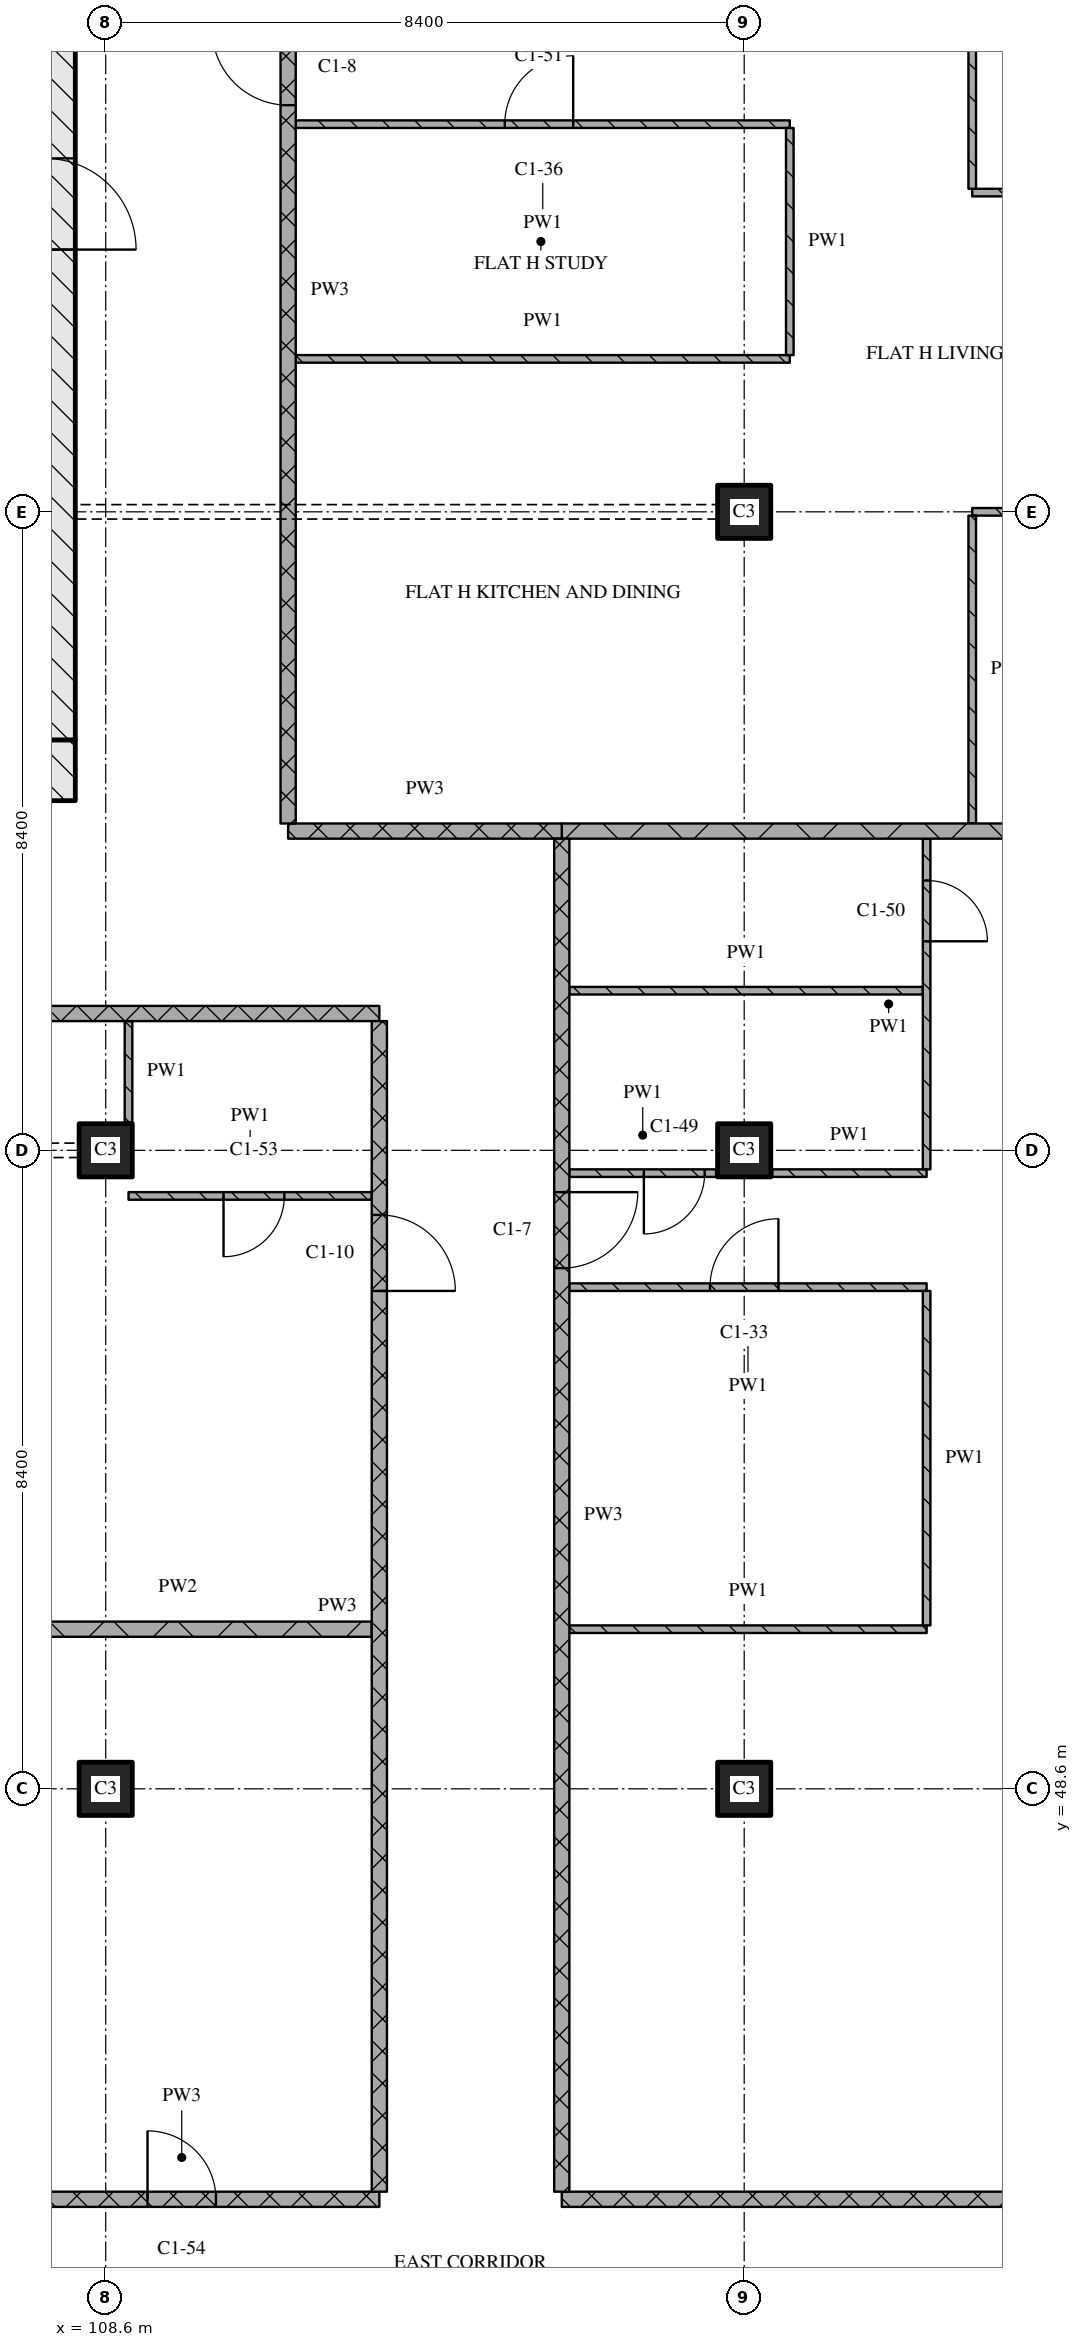
"""IFC4 building model, lengths in metres.
Left out: names, types, materials, properties, quantities, classifications, styles, units other than length and angle.
Written with IfcOpenShell. Run it as: python <this file> out.ifc"""

import sys

from ifc_helpers import new_model, si_unit, direction, frame, frame_2d, origin, origin_2d, place, context, subcontext, project, spatial, rectangle, extrude, element, fill, save


model = new_model("IFC4")
c1 = context("Model", 3, precision=1e-05, world=origin(), true_north=direction((0.0, 1.0)))
c2 = subcontext(c1, "Body", "Model", "MODEL_VIEW")
j1 = project(units=[si_unit("LENGTHUNIT", "METRE"), si_unit("PLANEANGLEUNIT", "RADIAN")], contexts=[c1])
p1 = place(None, origin())
s1 = spatial("IfcSite", under=j1, at=p1, CompositionType="ELEMENT")
p2 = place(p1, origin())
s2 = spatial("IfcBuilding", under=s1, at=p2, CompositionType="ELEMENT")
p3 = place(p2, frame((0.0, 0.0, 147.45)))
s3 = spatial("IfcBuildingStorey", under=s2, at=p3, CompositionType="ELEMENT", Elevation=147.45)
for number, where, z_axis, x_axis in (
    (1, (108.6, 48.6, 0.0), (0.0, 0.0, 1.0), (1.0, 0.0, 0.0)),
    (2, (108.6, 57.0, 0.0), (0.0, 0.0, 1.0), (1.0, 0.0, 0.0)),
    (3, (117.0, 48.6, 0.0), (0.0, 0.0, 1.0), (1.0, 0.0, 0.0)),
    (4, (117.0, 57.0, 0.0), (0.0, 0.0, 1.0), (1.0, 0.0, 0.0)),
    (5, (117.0, 65.4, 0.0), (0.0, 0.0, 1.0), (1.0, 0.0, 0.0)),
):
    element("IfcColumn", number, at=place(p3, frame(where, z_axis=z_axis, x_axis=x_axis)), inside=s3, PredefinedType="COLUMN", context=c2, shape_type="SweptSolid", body=[
        extrude(rectangle(XDim=0.7, YDim=0.7, at=origin_2d()), origin(), (0.0, 0.0, 1.0), 3.6),
    ])
p4 = place(p3, frame((67.0, 62.0, 0.0), z_axis=(0.0, 0.0, 1.0), x_axis=(1.0, 0.0, 0.0)))
e6 = element("IfcWall", 6, at=p4, inside=s3, PredefinedType="SOLIDWALL", context=c2, shape_type="SweptSolid", body=[
    extrude(rectangle(XDim=41.2, YDim=0.8, at=frame_2d((20.6, 0.0))), origin(), (0.0, 0.0, 1.0), 3.32),
])
p5 = place(p4, frame((20.95, 0.0, 0.0)))
e7 = element("IfcOpeningElement", 7, at=p5, cuts=e6, PredefinedType="OPENING", context=c2, shape_type="SweptSolid", body=[
    extrude(rectangle(XDim=1.8, YDim=2.1, at=frame_2d((0.9, 1.05))), frame((0.0, 0.41, 0.0), z_axis=(0.0, -1.0, 0.0), x_axis=(1.0, 0.0, 0.0)), (0.0, 0.0, 1.0), 0.82),
])
p6 = place(p3, frame((107.8, 62.4, 0.0), z_axis=(0.0, 0.0, 1.0), x_axis=(0.0, 1.0, 0.0)))
e8 = element("IfcWall", 8, at=p6, inside=s3, PredefinedType="SOLIDWALL", context=c2, shape_type="SweptSolid", body=[
    extrude(rectangle(XDim=12.0, YDim=0.8, at=frame_2d((6.0, 0.0))), origin(), (0.0, 0.0, 1.0), 3.32),
])
p7 = place(p6, frame((6.45, 0.0, 0.0)))
e9 = element("IfcOpeningElement", 9, at=p7, cuts=e8, PredefinedType="OPENING", context=c2, shape_type="SweptSolid", body=[
    extrude(rectangle(XDim=1.2, YDim=2.1, at=frame_2d((0.6, 1.05))), frame((0.0, 0.41, 0.0), z_axis=(0.0, -1.0, 0.0), x_axis=(1.0, 0.0, 0.0)), (0.0, 0.0, 1.0), 0.82),
])
p8 = place(p3, frame((107.0, 43.2, 0.0), z_axis=(0.0, 0.0, 1.0), x_axis=(1.0, 0.0, 0.0)))
e10 = element("IfcWall", 10, at=p8, inside=s3, PredefinedType="PARTITIONING", context=c2, shape_type="SweptSolid", body=[
    extrude(rectangle(XDim=5.2, YDim=0.2, at=frame_2d((2.6, 0.0))), origin(), (0.0, 0.0, 1.0), 3.32),
])
p9 = place(p8, frame((2.15, 0.0, 0.0)))
e11 = element("IfcOpeningElement", 11, at=p9, cuts=e10, PredefinedType="OPENING", context=c2, shape_type="SweptSolid", body=[
    extrude(rectangle(XDim=0.9, YDim=2.1, at=frame_2d((0.45, 1.05))), frame((0.0, 0.11, 0.0), z_axis=(0.0, -1.0, 0.0), x_axis=(1.0, 0.0, 0.0)), (0.0, 0.0, 1.0), 0.22),
])
p10 = place(p3, frame((114.6, 43.2, 0.0), z_axis=(0.0, 0.0, 1.0), x_axis=(1.0, 0.0, 0.0)))
e12 = element("IfcWall", 12, at=p10, inside=s3, PredefinedType="PARTITIONING", context=c2, shape_type="SweptSolid", body=[
    extrude(rectangle(XDim=12.32, YDim=0.2, at=frame_2d((6.16, 0.0))), origin(), (0.0, 0.0, 1.0), 3.32),
])
p11 = place(p3, frame((107.0, 50.7, 0.0), z_axis=(0.0, 0.0, 1.0), x_axis=(1.0, 0.0, 0.0)))
e13 = element("IfcWall", 13, at=p11, inside=s3, PredefinedType="PARTITIONING", context=c2, shape_type="SweptSolid", body=[
    extrude(rectangle(XDim=5.1, YDim=0.2, at=frame_2d((2.55, 0.0))), origin(), (0.0, 0.0, 1.0), 3.32),
])
p12 = place(p3, frame((114.7, 50.7, 0.0), z_axis=(0.0, 0.0, 1.0), x_axis=(1.0, 0.0, 0.0)))
e14 = element("IfcWall", 14, at=p12, inside=s3, PredefinedType="PARTITIONING", context=c2, shape_type="SweptSolid", body=[
    extrude(rectangle(XDim=4.7, YDim=0.1, at=frame_2d((2.35, 0.0))), origin(), (0.0, 0.0, 1.0), 3.32),
])
p13 = place(p3, frame((119.4, 55.2, 0.0), z_axis=(0.0, 0.0, 1.0), x_axis=(-1.0, 0.0, 0.0)))
e15 = element("IfcWall", 15, at=p13, inside=s3, PredefinedType="PARTITIONING", context=c2, shape_type="SweptSolid", body=[
    extrude(rectangle(XDim=4.7, YDim=0.1, at=frame_2d((2.35, 0.0))), origin(), (0.0, 0.0, 1.0), 3.32),
])
p14 = place(p13, frame((1.95, 0.0, 0.0)))
e16 = element("IfcOpeningElement", 16, at=p14, cuts=e15, PredefinedType="OPENING", context=c2, shape_type="SweptSolid", body=[
    extrude(rectangle(XDim=0.9, YDim=2.1, at=frame_2d((0.45, 1.05))), frame((0.0, 0.06, 0.0), z_axis=(0.0, -1.0, 0.0), x_axis=(1.0, 0.0, 0.0)), (0.0, 0.0, 1.0), 0.12),
])
p15 = place(p3, frame((108.9, 56.4, 0.0), z_axis=(0.0, 0.0, 1.0), x_axis=(1.0, 0.0, 0.0)))
e17 = element("IfcWall", 17, at=p15, inside=s3, PredefinedType="PARTITIONING", context=c2, shape_type="SweptSolid", body=[
    extrude(rectangle(XDim=3.2, YDim=0.1, at=frame_2d((1.6, 0.0))), origin(), (0.0, 0.0, 1.0), 3.32),
])
p16 = place(p15, frame((1.25, 0.0, 0.0)))
e18 = element("IfcOpeningElement", 18, at=p16, cuts=e17, PredefinedType="OPENING", context=c2, shape_type="SweptSolid", body=[
    extrude(rectangle(XDim=0.8, YDim=2.1, at=frame_2d((0.4, 1.05))), frame((0.0, 0.06, 0.0), z_axis=(0.0, -1.0, 0.0), x_axis=(1.0, 0.0, 0.0)), (0.0, 0.0, 1.0), 0.12),
])
p17 = place(p3, frame((114.7, 56.7, 0.0), z_axis=(0.0, 0.0, 1.0), x_axis=(1.0, 0.0, 0.0)))
e19 = element("IfcWall", 19, at=p17, inside=s3, PredefinedType="PARTITIONING", context=c2, shape_type="SweptSolid", body=[
    extrude(rectangle(XDim=1.93, YDim=0.1, at=frame_2d((0.965, 0.0))), origin(), (0.0, 0.0, 1.0), 3.32),
])
p18 = place(p17, frame((0.98, 0.0, 0.0)))
e20 = element("IfcOpeningElement", 20, at=p18, cuts=e19, PredefinedType="OPENING", context=c2, shape_type="SweptSolid", body=[
    extrude(rectangle(XDim=0.8, YDim=2.1, at=frame_2d((0.4, 1.05))), frame((0.0, 0.06, 0.0), z_axis=(0.0, -1.0, 0.0), x_axis=(1.0, 0.0, 0.0)), (0.0, 0.0, 1.0), 0.12),
])
p19 = place(p3, frame((117.37, 56.7, 0.0), z_axis=(0.0, 0.0, 1.0), x_axis=(1.0, 0.0, 0.0)))
e21 = element("IfcWall", 21, at=p19, inside=s3, PredefinedType="PARTITIONING", context=c2, shape_type="SweptSolid", body=[
    extrude(rectangle(XDim=2.03, YDim=0.1, at=frame_2d((1.015, 0.0))), origin(), (0.0, 0.0, 1.0), 3.32),
])
p20 = place(p3, frame((101.4, 58.8, 0.0), z_axis=(0.0, 0.0, 1.0), x_axis=(1.0, 0.0, 0.0)))
e22 = element("IfcWall", 22, at=p20, inside=s3, PredefinedType="PARTITIONING", context=c2, shape_type="SweptSolid", body=[
    extrude(rectangle(XDim=10.8, YDim=0.2, at=frame_2d((5.4, 0.0))), origin(), (0.0, 0.0, 1.0), 3.32),
])
p21 = place(p3, frame((114.7, 59.1, 0.0), z_axis=(0.0, 0.0, 1.0), x_axis=(1.0, 0.0, 0.0)))
e23 = element("IfcWall", 23, at=p21, inside=s3, PredefinedType="PARTITIONING", context=c2, shape_type="SweptSolid", body=[
    extrude(rectangle(XDim=4.65, YDim=0.1, at=frame_2d((2.325, 0.0))), origin(), (0.0, 0.0, 1.0), 3.32),
])
p22 = place(p3, frame((111.0, 61.2, 0.0), z_axis=(0.0, 0.0, 1.0), x_axis=(1.0, 0.0, 0.0)))
e24 = element("IfcWall", 24, at=p22, inside=s3, PredefinedType="PARTITIONING", context=c2, shape_type="SweptSolid", body=[
    extrude(rectangle(XDim=3.6, YDim=0.2, at=frame_2d((1.8, 0.0))), origin(), (0.0, 0.0, 1.0), 3.32),
])
p23 = place(p3, frame((114.6, 61.2, 0.0), z_axis=(0.0, 0.0, 1.0), x_axis=(1.0, 0.0, 0.0)))
e25 = element("IfcWall", 25, at=p23, inside=s3, PredefinedType="PARTITIONING", context=c2, shape_type="SweptSolid", body=[
    extrude(rectangle(XDim=12.32, YDim=0.2, at=frame_2d((6.16, 0.0))), origin(), (0.0, 0.0, 1.0), 3.32),
])
p24 = place(p3, frame((124.48, 65.4, 0.0), z_axis=(0.0, 0.0, 1.0), x_axis=(-1.0, 0.0, 0.0)))
e26 = element("IfcWall", 26, at=p24, inside=s3, PredefinedType="PARTITIONING", context=c2, shape_type="SweptSolid", body=[
    extrude(rectangle(XDim=4.48, YDim=0.1, at=frame_2d((2.24, 0.0))), origin(), (0.0, 0.0, 1.0), 3.32),
])
p25 = place(p24, frame((0.43, 0.0, 0.0)))
e27 = element("IfcOpeningElement", 27, at=p25, cuts=e26, PredefinedType="OPENING", context=c2, shape_type="SweptSolid", body=[
    extrude(rectangle(XDim=0.9, YDim=2.1, at=frame_2d((0.45, 1.05))), frame((0.0, 0.06, 0.0), z_axis=(0.0, -1.0, 0.0), x_axis=(1.0, 0.0, 0.0)), (0.0, 0.0, 1.0), 0.12),
])
p26 = place(p3, frame((111.1, 67.412, 0.0), z_axis=(0.0, 0.0, 1.0), x_axis=(1.0, 0.0, 0.0)))
e28 = element("IfcWall", 28, at=p26, inside=s3, PredefinedType="PARTITIONING", context=c2, shape_type="SweptSolid", body=[
    extrude(rectangle(XDim=6.5, YDim=0.1, at=frame_2d((3.25, 0.0))), origin(), (0.0, 0.0, 1.0), 3.32),
])
p27 = place(p3, frame((120.0, 69.6, 0.0), z_axis=(0.0, 0.0, 1.0), x_axis=(1.0, 0.0, 0.0)))
e29 = element("IfcWall", 29, at=p27, inside=s3, PredefinedType="PARTITIONING", context=c2, shape_type="SweptSolid", body=[
    extrude(rectangle(XDim=6.92, YDim=0.1, at=frame_2d((3.46, 0.0))), origin(), (0.0, 0.0, 1.0), 3.32),
])
p28 = place(p3, frame((117.6, 70.5, 0.0), z_axis=(0.0, 0.0, 1.0), x_axis=(-1.0, 0.0, 0.0)))
e30 = element("IfcWall", 30, at=p28, inside=s3, PredefinedType="PARTITIONING", context=c2, shape_type="SweptSolid", body=[
    extrude(rectangle(XDim=6.5, YDim=0.1, at=frame_2d((3.25, 0.0))), origin(), (0.0, 0.0, 1.0), 3.32),
])
p29 = place(p28, frame((2.85, 0.0, 0.0)))
e31 = element("IfcOpeningElement", 31, at=p29, cuts=e30, PredefinedType="OPENING", context=c2, shape_type="SweptSolid", body=[
    extrude(rectangle(XDim=0.9, YDim=2.1, at=frame_2d((0.45, 1.05))), frame((0.0, 0.06, 0.0), z_axis=(0.0, -1.0, 0.0), x_axis=(1.0, 0.0, 0.0)), (0.0, 0.0, 1.0), 0.12),
])
p30 = place(p3, frame((108.9, 58.7, 0.0), z_axis=(0.0, 0.0, 1.0), x_axis=(0.0, -1.0, 0.0)))
e32 = element("IfcWall", 32, at=p30, inside=s3, PredefinedType="PARTITIONING", context=c2, shape_type="SweptSolid", body=[
    extrude(rectangle(XDim=1.33, YDim=0.1, at=frame_2d((0.665, 0.0))), origin(), (0.0, 0.0, 1.0), 3.32),
])
p31 = place(p3, frame((111.0, 75.32, 0.0), z_axis=(0.0, 0.0, 1.0), x_axis=(0.0, -1.0, 0.0)))
e33 = element("IfcWall", 33, at=p31, inside=s3, PredefinedType="PARTITIONING", context=c2, shape_type="SweptSolid", body=[
    extrude(rectangle(XDim=14.02, YDim=0.2, at=frame_2d((7.01, 0.0))), origin(), (0.0, 0.0, 1.0), 3.32),
])
p32 = place(p31, frame((3.57, 0.0, 0.0)))
e34 = element("IfcOpeningElement", 34, at=p32, cuts=e33, PredefinedType="OPENING", context=c2, shape_type="SweptSolid", body=[
    extrude(rectangle(XDim=1.0, YDim=2.1, at=frame_2d((0.5, 1.05))), frame((0.0, 0.11, 0.0), z_axis=(0.0, -1.0, 0.0), x_axis=(1.0, 0.0, 0.0)), (0.0, 0.0, 1.0), 0.22),
])
p33 = place(p3, frame((112.2, 43.3, 0.0), z_axis=(0.0, 0.0, 1.0), x_axis=(0.0, 1.0, 0.0)))
e35 = element("IfcWall", 35, at=p33, inside=s3, PredefinedType="PARTITIONING", context=c2, shape_type="SweptSolid", body=[
    extrude(rectangle(XDim=15.4, YDim=0.2, at=frame_2d((7.7, 0.0))), origin(), (0.0, 0.0, 1.0), 3.32),
])
p34 = place(p33, frame((11.85, 0.0, 0.0)))
e36 = element("IfcOpeningElement", 36, at=p34, cuts=e35, PredefinedType="OPENING", context=c2, shape_type="SweptSolid", body=[
    extrude(rectangle(XDim=1.0, YDim=2.1, at=frame_2d((0.5, 1.05))), frame((0.0, 0.11, 0.0), z_axis=(0.0, -1.0, 0.0), x_axis=(1.0, 0.0, 0.0)), (0.0, 0.0, 1.0), 0.22),
])
p35 = place(p3, frame((114.6, 61.1, 0.0), z_axis=(0.0, 0.0, 1.0), x_axis=(0.0, -1.0, 0.0)))
e37 = element("IfcWall", 37, at=p35, inside=s3, PredefinedType="PARTITIONING", context=c2, shape_type="SweptSolid", body=[
    extrude(rectangle(XDim=17.8, YDim=0.2, at=frame_2d((8.9, 0.0))), origin(), (0.0, 0.0, 1.0), 3.32),
])
p36 = place(p35, frame((4.65, 0.0, 0.0)))
e38 = element("IfcOpeningElement", 38, at=p36, cuts=e37, PredefinedType="OPENING", context=c2, shape_type="SweptSolid", body=[
    extrude(rectangle(XDim=1.0, YDim=2.1, at=frame_2d((0.5, 1.05))), frame((0.0, 0.11, 0.0), z_axis=(0.0, -1.0, 0.0), x_axis=(1.0, 0.0, 0.0)), (0.0, 0.0, 1.0), 0.22),
])
p37 = place(p3, frame((117.6, 70.45, 0.0), z_axis=(0.0, 0.0, 1.0), x_axis=(0.0, -1.0, 0.0)))
e39 = element("IfcWall", 39, at=p37, inside=s3, PredefinedType="PARTITIONING", context=c2, shape_type="SweptSolid", body=[
    extrude(rectangle(XDim=2.988, YDim=0.1, at=frame_2d((1.494, 0.0))), origin(), (0.0, 0.0, 1.0), 3.32),
])
p38 = place(p3, frame((119.4, 55.15, 0.0), z_axis=(0.0, 0.0, 1.0), x_axis=(0.0, -1.0, 0.0)))
e40 = element("IfcWall", 40, at=p38, inside=s3, PredefinedType="PARTITIONING", context=c2, shape_type="SweptSolid", body=[
    extrude(rectangle(XDim=4.4, YDim=0.1, at=frame_2d((2.2, 0.0))), origin(), (0.0, 0.0, 1.0), 3.32),
])
p39 = place(p3, frame((119.4, 56.75, 0.0), z_axis=(0.0, 0.0, 1.0), x_axis=(0.0, 1.0, 0.0)))
e41 = element("IfcWall", 41, at=p39, inside=s3, PredefinedType="PARTITIONING", context=c2, shape_type="SweptSolid", body=[
    extrude(rectangle(XDim=4.35, YDim=0.1, at=frame_2d((2.175, 0.0))), origin(), (0.0, 0.0, 1.0), 3.32),
])
p40 = place(p39, frame((3.0, 0.0, 0.0)))
e42 = element("IfcOpeningElement", 42, at=p40, cuts=e41, PredefinedType="OPENING", context=c2, shape_type="SweptSolid", body=[
    extrude(rectangle(XDim=0.8, YDim=2.1, at=frame_2d((0.4, 1.05))), frame((0.0, 0.06, 0.0), z_axis=(0.0, -1.0, 0.0), x_axis=(1.0, 0.0, 0.0)), (0.0, 0.0, 1.0), 0.12),
])
p41 = place(p3, frame((120.0, 65.35, 0.0), z_axis=(0.0, 0.0, 1.0), x_axis=(0.0, -1.0, 0.0)))
e43 = element("IfcWall", 43, at=p41, inside=s3, PredefinedType="PARTITIONING", context=c2, shape_type="SweptSolid", body=[
    extrude(rectangle(XDim=4.05, YDim=0.1, at=frame_2d((2.025, 0.0))), origin(), (0.0, 0.0, 1.0), 3.32),
])
p42 = place(p3, frame((120.0, 75.32, 0.0), z_axis=(0.0, 0.0, 1.0), x_axis=(0.0, -1.0, 0.0)))
e44 = element("IfcWall", 44, at=p42, inside=s3, PredefinedType="PARTITIONING", context=c2, shape_type="SweptSolid", body=[
    extrude(rectangle(XDim=5.67, YDim=0.1, at=frame_2d((2.835, 0.0))), origin(), (0.0, 0.0, 1.0), 3.32),
])
p43 = place(p42, frame((2.891, 0.0, 0.0)))
e45 = element("IfcOpeningElement", 45, at=p43, cuts=e44, PredefinedType="OPENING", context=c2, shape_type="SweptSolid", body=[
    extrude(rectangle(XDim=0.9, YDim=2.1, at=frame_2d((0.45, 1.05))), frame((0.0, 0.06, 0.0), z_axis=(0.0, -1.0, 0.0), x_axis=(1.0, 0.0, 0.0)), (0.0, 0.0, 1.0), 0.12),
])
p44 = place(p9, origin())
e46 = element("IfcDoor", 46, at=p44, inside=s3, OperationType="SINGLE_SWING_LEFT", PredefinedType="DOOR", context=c2, shape_type="SweptSolid", body=[
    extrude(rectangle(XDim=0.9, YDim=2.1, at=frame_2d((0.45, 1.05))), frame((0.0, 0.025, 0.0), z_axis=(0.0, -1.0, 0.0), x_axis=(1.0, 0.0, 0.0)), (0.0, 0.0, 1.0), 0.05),
])
fill(e11, e46)
p45 = place(p14, origin())
e47 = element("IfcDoor", 47, at=p45, inside=s3, OperationType="SINGLE_SWING_RIGHT", PredefinedType="DOOR", context=c2, shape_type="SweptSolid", body=[
    extrude(rectangle(XDim=0.9, YDim=2.1, at=frame_2d((0.45, 1.05))), frame((0.0, 0.025, 0.0), z_axis=(0.0, -1.0, 0.0), x_axis=(1.0, 0.0, 0.0)), (0.0, 0.0, 1.0), 0.05),
])
fill(e16, e47)
p46 = place(p16, origin())
e48 = element("IfcDoor", 48, at=p46, inside=s3, OperationType="SINGLE_SWING_RIGHT", PredefinedType="DOOR", context=c2, shape_type="SweptSolid", body=[
    extrude(rectangle(XDim=0.8, YDim=2.1, at=frame_2d((0.4, 1.05))), frame((0.0, 0.025, 0.0), z_axis=(0.0, -1.0, 0.0), x_axis=(1.0, 0.0, 0.0)), (0.0, 0.0, 1.0), 0.05),
])
fill(e18, e48)
p47 = place(p18, origin())
e49 = element("IfcDoor", 49, at=p47, inside=s3, OperationType="SINGLE_SWING_RIGHT", PredefinedType="DOOR", context=c2, shape_type="SweptSolid", body=[
    extrude(rectangle(XDim=0.8, YDim=2.1, at=frame_2d((0.4, 1.05))), frame((0.0, 0.025, 0.0), z_axis=(0.0, -1.0, 0.0), x_axis=(1.0, 0.0, 0.0)), (0.0, 0.0, 1.0), 0.05),
])
fill(e20, e49)
p48 = place(p29, origin())
e50 = element("IfcDoor", 50, at=p48, inside=s3, OperationType="SINGLE_SWING_RIGHT", PredefinedType="DOOR", context=c2, shape_type="SweptSolid", body=[
    extrude(rectangle(XDim=0.9, YDim=2.1, at=frame_2d((0.45, 1.05))), frame((0.0, 0.025, 0.0), z_axis=(0.0, -1.0, 0.0), x_axis=(1.0, 0.0, 0.0)), (0.0, 0.0, 1.0), 0.05),
])
fill(e31, e50)
p49 = place(p32, origin())
e51 = element("IfcDoor", 51, at=p49, inside=s3, OperationType="SINGLE_SWING_RIGHT", PredefinedType="DOOR", context=c2, shape_type="SweptSolid", body=[
    extrude(rectangle(XDim=1.0, YDim=2.1, at=frame_2d((0.5, 1.05))), frame((0.0, 0.025, 0.0), z_axis=(0.0, -1.0, 0.0), x_axis=(1.0, 0.0, 0.0)), (0.0, 0.0, 1.0), 0.05),
])
fill(e34, e51)
p50 = place(p34, origin())
e52 = element("IfcDoor", 52, at=p50, inside=s3, OperationType="SINGLE_SWING_RIGHT", PredefinedType="DOOR", context=c2, shape_type="SweptSolid", body=[
    extrude(rectangle(XDim=1.0, YDim=2.1, at=frame_2d((0.5, 1.05))), frame((0.0, 0.025, 0.0), z_axis=(0.0, -1.0, 0.0), x_axis=(1.0, 0.0, 0.0)), (0.0, 0.0, 1.0), 0.05),
])
fill(e36, e52)
p51 = place(p36, origin())
e53 = element("IfcDoor", 53, at=p51, inside=s3, OperationType="SINGLE_SWING_LEFT", PredefinedType="DOOR", context=c2, shape_type="SweptSolid", body=[
    extrude(rectangle(XDim=1.0, YDim=2.1, at=frame_2d((0.5, 1.05))), frame((0.0, 0.025, 0.0), z_axis=(0.0, -1.0, 0.0), x_axis=(1.0, 0.0, 0.0)), (0.0, 0.0, 1.0), 0.05),
])
fill(e38, e53)
p52 = place(p40, origin())
e54 = element("IfcDoor", 54, at=p52, inside=s3, OperationType="SINGLE_SWING_RIGHT", PredefinedType="DOOR", context=c2, shape_type="SweptSolid", body=[
    extrude(rectangle(XDim=0.8, YDim=2.1, at=frame_2d((0.4, 1.05))), frame((0.0, 0.025, 0.0), z_axis=(0.0, -1.0, 0.0), x_axis=(1.0, 0.0, 0.0)), (0.0, 0.0, 1.0), 0.05),
])
fill(e42, e54)
save(model, sys.argv[1])
